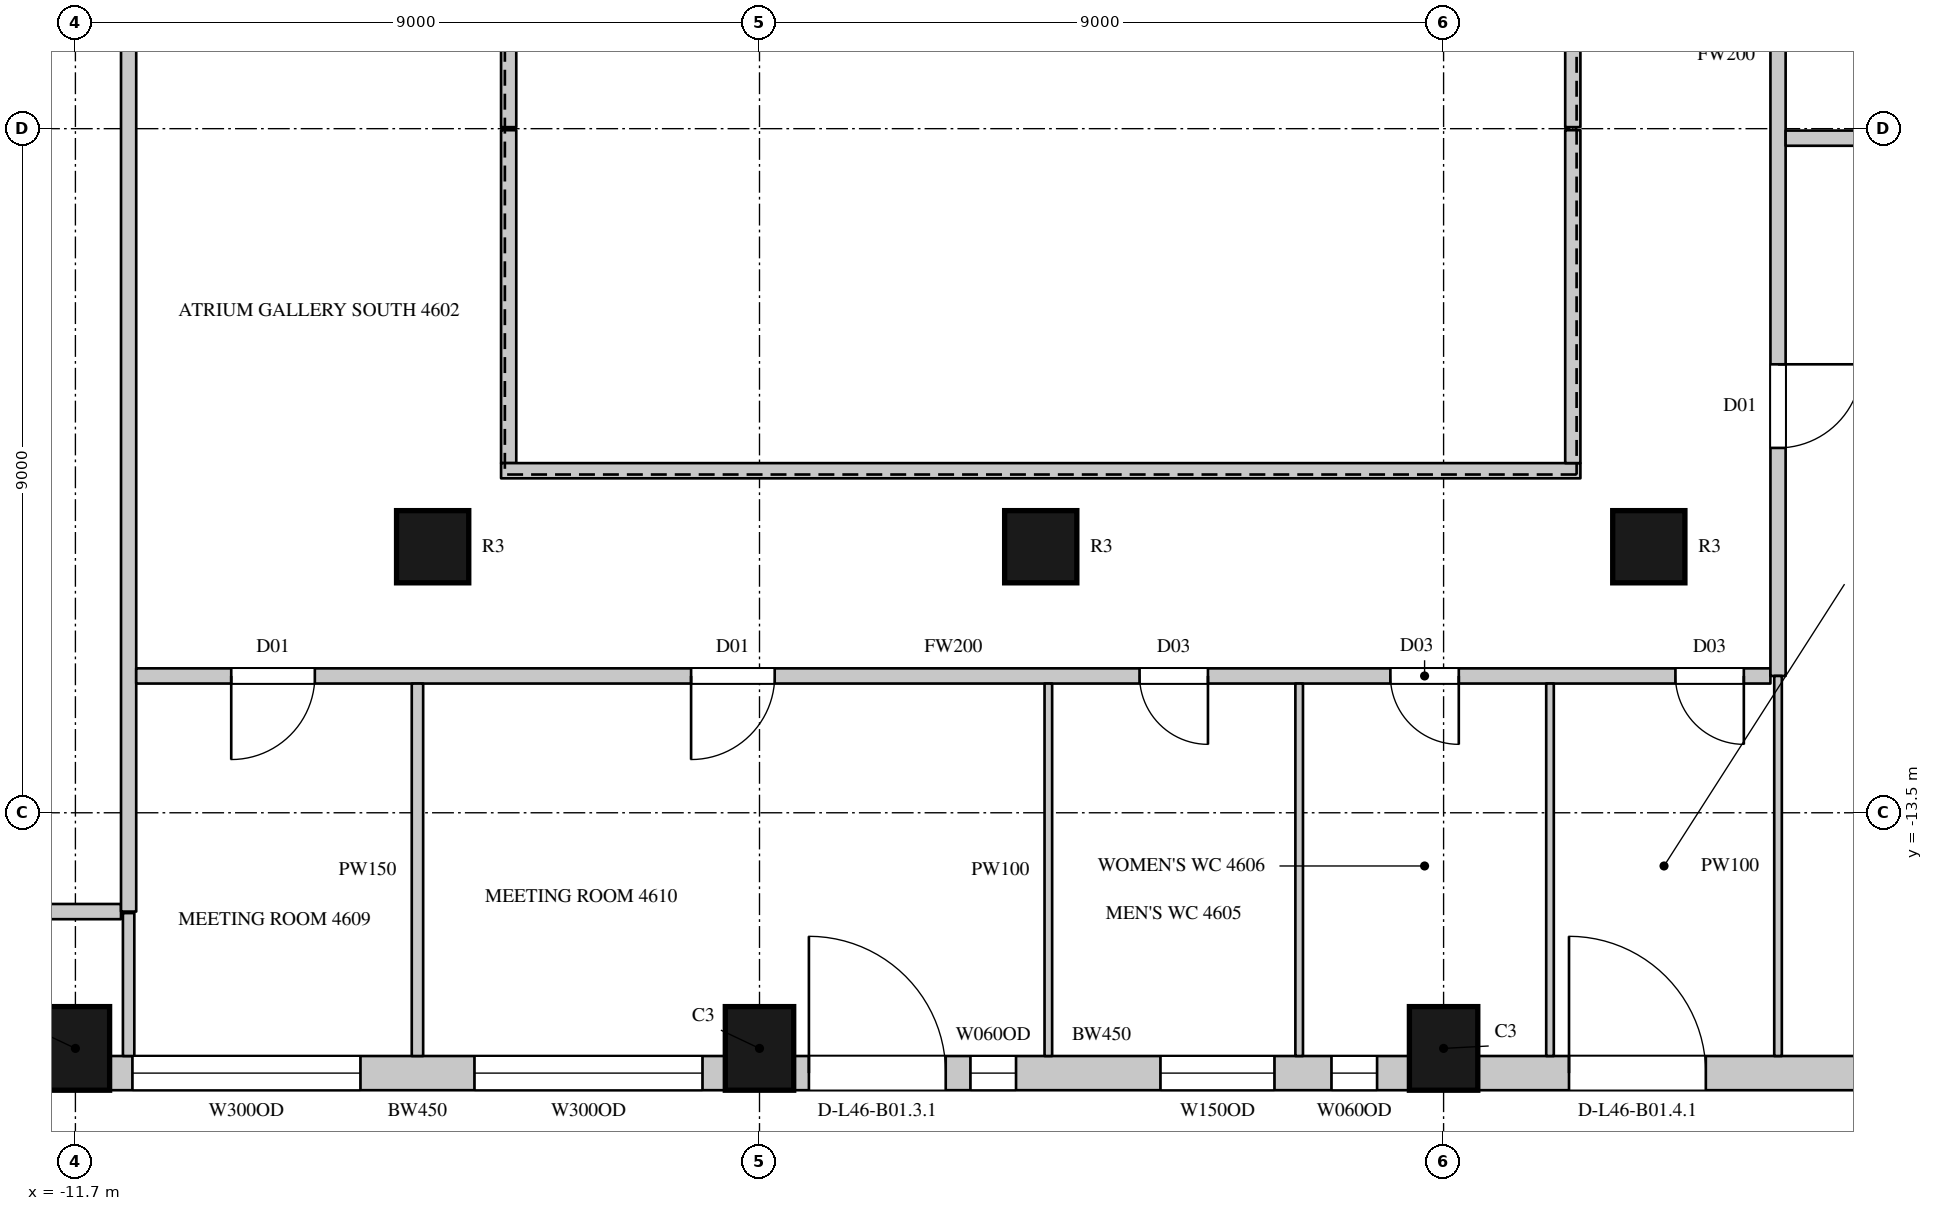
"""IFC4 building model, lengths in metres.
Left out: names, types, materials, properties, quantities, classifications, styles, units other than length and angle.
Written with IfcOpenShell. Run it as: python <this file> out.ifc"""

import sys

from ifc_helpers import new_model, si_unit, direction, frame, frame_2d, origin, origin_2d, place, context, subcontext, project, spatial, rectangle, circle, extrude, element, fill, save


model = new_model("IFC4")
c1 = context("Model", 3, precision=1e-05, world=origin(), true_north=direction((0.0, 1.0)))
c2 = subcontext(c1, "Body", "Model", "MODEL_VIEW")
j1 = project(units=[si_unit("LENGTHUNIT", "METRE"), si_unit("PLANEANGLEUNIT", "RADIAN")], contexts=[c1])
p1 = place(None, origin())
s1 = spatial("IfcSite", under=j1, at=p1, CompositionType="ELEMENT")
p2 = place(p1, origin())
s2 = spatial("IfcBuilding", under=s1, at=p2, CompositionType="ELEMENT")
p3 = place(p2, frame((0.0, 0.0, 209.7)))
s3 = spatial("IfcBuildingStorey", under=s2, at=p3, CompositionType="ELEMENT", Elevation=209.7)
for number, where, z_axis, x_axis in (
    (1, (-11.7, -16.6, 0.0), (0.0, 0.0, 1.0), (1.0, 0.0, 0.0)),
    (2, (-2.7, -16.6, 0.0), (0.0, 0.0, 1.0), (1.0, 0.0, 0.0)),
    (3, (6.3, -16.6, 0.0), (0.0, 0.0, 1.0), (1.0, 0.0, 0.0)),
):
    element("IfcColumn", number, at=place(p3, frame(where, z_axis=z_axis, x_axis=x_axis)), inside=s3, PredefinedType="COLUMN", context=c2, shape_type="SweptSolid", body=[
        extrude(rectangle(XDim=0.9, YDim=1.1, at=origin_2d()), origin(), (0.0, 0.0, 1.0), 4.1),
    ])
for number, where, z_axis, x_axis in (
    (4, (-7.0, -10.0, 0.0), (0.0, 0.0, 1.0), (1.0, 0.0, 0.0)),
    (5, (1.0, -10.0, 0.0), (0.0, 0.0, 1.0), (1.0, 0.0, 0.0)),
    (6, (9.0, -10.0, 0.0), (0.0, 0.0, 1.0), (1.0, 0.0, 0.0)),
):
    element("IfcColumn", number, at=place(p3, frame(where, z_axis=z_axis, x_axis=x_axis)), inside=s3, PredefinedType="COLUMN", context=c2, shape_type="SweptSolid", body=[
        extrude(circle(Radius=0.475, at=origin_2d()), origin(), (0.0, 0.0, 1.0), 4.1),
    ])
p4 = place(p3, frame((-11.25, -16.925, 0.0), z_axis=(0.0, 0.0, 1.0), x_axis=(1.0, 0.0, 0.0)))
e7 = element("IfcWall", 7, at=p4, inside=s3, PredefinedType="SOLIDWALL", context=c2, shape_type="SweptSolid", body=[
    extrude(rectangle(XDim=8.1, YDim=0.45, at=frame_2d((4.05, 0.0))), origin(), (0.0, 0.0, 1.0), 3.8),
])
p5 = place(p4, frame((0.3, 0.0, 1.05)))
e8 = element("IfcOpeningElement", 8, at=p5, cuts=e7, PredefinedType="OPENING", context=c2, shape_type="SweptSolid", body=[
    extrude(rectangle(XDim=3.0, YDim=2.4, at=frame_2d((1.5, 1.2))), frame((0.0, 0.235, 0.0), z_axis=(0.0, -1.0, 0.0), x_axis=(1.0, 0.0, 0.0)), (0.0, 0.0, 1.0), 0.47),
])
p6 = place(p4, frame((4.8, 0.0, 1.05)))
e9 = element("IfcOpeningElement", 9, at=p6, cuts=e7, PredefinedType="OPENING", context=c2, shape_type="SweptSolid", body=[
    extrude(rectangle(XDim=3.0, YDim=2.4, at=frame_2d((1.5, 1.2))), frame((0.0, 0.235, 0.0), z_axis=(0.0, -1.0, 0.0), x_axis=(1.0, 0.0, 0.0)), (0.0, 0.0, 1.0), 0.47),
])
p7 = place(p3, frame((-2.25, -16.925, 0.0), z_axis=(0.0, 0.0, 1.0), x_axis=(1.0, 0.0, 0.0)))
e10 = element("IfcWall", 10, at=p7, inside=s3, PredefinedType="SOLIDWALL", context=c2, shape_type="SweptSolid", body=[
    extrude(rectangle(XDim=8.1, YDim=0.45, at=frame_2d((4.05, 0.0))), origin(), (0.0, 0.0, 1.0), 3.8),
])
p8 = place(p7, frame((0.2, 0.0, 0.0)))
e11 = element("IfcOpeningElement", 11, at=p8, cuts=e10, PredefinedType="OPENING", context=c2, shape_type="SweptSolid", body=[
    extrude(rectangle(XDim=1.8, YDim=2.4, at=frame_2d((0.9, 1.2))), frame((0.0, 0.235, 0.0), z_axis=(0.0, -1.0, 0.0), x_axis=(1.0, 0.0, 0.0)), (0.0, 0.0, 1.0), 0.47),
])
p9 = place(p7, frame((2.325, 0.0, 1.05)))
e12 = element("IfcOpeningElement", 12, at=p9, cuts=e10, PredefinedType="OPENING", context=c2, shape_type="SweptSolid", body=[
    extrude(rectangle(XDim=0.6, YDim=2.4, at=frame_2d((0.3, 1.2))), frame((0.0, 0.235, 0.0), z_axis=(0.0, -1.0, 0.0), x_axis=(1.0, 0.0, 0.0)), (0.0, 0.0, 1.0), 0.47),
])
p10 = place(p7, frame((4.825, 0.0, 1.05)))
e13 = element("IfcOpeningElement", 13, at=p10, cuts=e10, PredefinedType="OPENING", context=c2, shape_type="SweptSolid", body=[
    extrude(rectangle(XDim=1.5, YDim=2.4, at=frame_2d((0.75, 1.2))), frame((0.0, 0.235, 0.0), z_axis=(0.0, -1.0, 0.0), x_axis=(1.0, 0.0, 0.0)), (0.0, 0.0, 1.0), 0.47),
])
p11 = place(p7, frame((7.075, 0.0, 1.05)))
e14 = element("IfcOpeningElement", 14, at=p11, cuts=e10, PredefinedType="OPENING", context=c2, shape_type="SweptSolid", body=[
    extrude(rectangle(XDim=0.6, YDim=2.4, at=frame_2d((0.3, 1.2))), frame((0.0, 0.235, 0.0), z_axis=(0.0, -1.0, 0.0), x_axis=(1.0, 0.0, 0.0)), (0.0, 0.0, 1.0), 0.47),
])
p12 = place(p3, frame((6.75, -16.925, 0.0), z_axis=(0.0, 0.0, 1.0), x_axis=(1.0, 0.0, 0.0)))
e15 = element("IfcWall", 15, at=p12, inside=s3, PredefinedType="SOLIDWALL", context=c2, shape_type="SweptSolid", body=[
    extrude(rectangle(XDim=6.414, YDim=0.45, at=frame_2d((3.207, 0.0))), origin(), (0.0, 0.0, 1.0), 3.8),
])
p13 = place(p12, frame((1.2, 0.0, 0.0)))
e16 = element("IfcOpeningElement", 16, at=p13, cuts=e15, PredefinedType="OPENING", context=c2, shape_type="SweptSolid", body=[
    extrude(rectangle(XDim=1.8, YDim=2.4, at=frame_2d((0.9, 1.2))), frame((0.0, 0.235, 0.0), z_axis=(0.0, -1.0, 0.0), x_axis=(1.0, 0.0, 0.0)), (0.0, 0.0, 1.0), 0.47),
])
p14 = place(p3, frame((-13.97, -14.8, 0.0), z_axis=(0.0, 0.0, 1.0), x_axis=(1.0, 0.0, 0.0)))
e17 = element("IfcWall", 17, at=p14, inside=s3, PredefinedType="PARTITIONING", context=c2, shape_type="SweptSolid", body=[
    extrude(rectangle(XDim=2.87, YDim=0.2, at=frame_2d((1.435, 0.0))), origin(), (0.0, 0.0, 1.0), 3.8),
])
p15 = place(p3, frame((-11.0, -14.8, 0.0), z_axis=(0.0, 0.0, 1.0), x_axis=(0.0, 1.0, 0.0)))
e18 = element("IfcWall", 18, at=p15, inside=s3, PredefinedType="PARTITIONING", context=c2, shape_type="SweptSolid", body=[
    extrude(rectangle(XDim=29.6, YDim=0.2, at=frame_2d((14.8, 0.0))), origin(), (0.0, 0.0, 1.0), 3.8),
])
p16 = place(p15, frame((17.9, 0.0, 0.0)))
e19 = element("IfcOpeningElement", 19, at=p16, cuts=e18, PredefinedType="OPENING", context=c2, shape_type="SweptSolid", body=[
    extrude(rectangle(XDim=1.5, YDim=2.4, at=frame_2d((0.75, 1.2))), frame((0.0, 0.11, 0.0), z_axis=(0.0, -1.0, 0.0), x_axis=(1.0, 0.0, 0.0)), (0.0, 0.0, 1.0), 0.22),
])
p17 = place(p3, frame((-10.9, -11.7, 0.0), z_axis=(0.0, 0.0, 1.0), x_axis=(1.0, 0.0, 0.0)))
e20 = element("IfcWall", 20, at=p17, inside=s3, PredefinedType="PARTITIONING", context=c2, shape_type="SweptSolid", body=[
    extrude(rectangle(XDim=21.5, YDim=0.2, at=frame_2d((10.75, 0.0))), origin(), (0.0, 0.0, 1.0), 3.8),
])
p18 = place(p17, frame((13.2, 0.0, 0.0)))
e21 = element("IfcOpeningElement", 21, at=p18, cuts=e20, PredefinedType="OPENING", context=c2, shape_type="SweptSolid", body=[
    extrude(rectangle(XDim=0.9, YDim=2.2, at=frame_2d((0.45, 1.1))), frame((0.0, 0.11, 0.0), z_axis=(0.0, -1.0, 0.0), x_axis=(1.0, 0.0, 0.0)), (0.0, 0.0, 1.0), 0.22),
])
p19 = place(p17, frame((16.5, 0.0, 0.0)))
e22 = element("IfcOpeningElement", 22, at=p19, cuts=e20, PredefinedType="OPENING", context=c2, shape_type="SweptSolid", body=[
    extrude(rectangle(XDim=0.9, YDim=2.2, at=frame_2d((0.45, 1.1))), frame((0.0, 0.11, 0.0), z_axis=(0.0, -1.0, 0.0), x_axis=(1.0, 0.0, 0.0)), (0.0, 0.0, 1.0), 0.22),
])
p20 = place(p17, frame((20.25, 0.0, 0.0)))
e23 = element("IfcOpeningElement", 23, at=p20, cuts=e20, PredefinedType="OPENING", context=c2, shape_type="SweptSolid", body=[
    extrude(rectangle(XDim=0.9, YDim=2.2, at=frame_2d((0.45, 1.1))), frame((0.0, 0.11, 0.0), z_axis=(0.0, -1.0, 0.0), x_axis=(1.0, 0.0, 0.0)), (0.0, 0.0, 1.0), 0.22),
])
p21 = place(p17, frame((1.25, 0.0, 0.0)))
e24 = element("IfcOpeningElement", 24, at=p21, cuts=e20, PredefinedType="OPENING", context=c2, shape_type="SweptSolid", body=[
    extrude(rectangle(XDim=1.1, YDim=2.4, at=frame_2d((0.55, 1.2))), frame((0.0, 0.11, 0.0), z_axis=(0.0, -1.0, 0.0), x_axis=(1.0, 0.0, 0.0)), (0.0, 0.0, 1.0), 0.22),
])
p22 = place(p17, frame((7.3, 0.0, 0.0)))
e25 = element("IfcOpeningElement", 25, at=p22, cuts=e20, PredefinedType="OPENING", context=c2, shape_type="SweptSolid", body=[
    extrude(rectangle(XDim=1.1, YDim=2.4, at=frame_2d((0.55, 1.2))), frame((0.0, 0.11, 0.0), z_axis=(0.0, -1.0, 0.0), x_axis=(1.0, 0.0, 0.0)), (0.0, 0.0, 1.0), 0.22),
])
p23 = place(p3, frame((-6.0, -8.9, 0.0), z_axis=(0.0, 0.0, 1.0), x_axis=(0.0, 1.0, 0.0)))
e26 = element("IfcWall", 26, at=p23, inside=s3, PredefinedType="PARTITIONING", context=c2, shape_type="SweptSolid", body=[
    extrude(rectangle(XDim=4.38, YDim=0.2, at=frame_2d((2.19, 0.0))), origin(), (0.0, 0.0, 1.0), 3.8),
])
p24 = place(p3, frame((-6.1, -9.0, 0.0), z_axis=(0.0, 0.0, 1.0), x_axis=(1.0, 0.0, 0.0)))
e27 = element("IfcWall", 27, at=p24, inside=s3, PredefinedType="PARTITIONING", context=c2, shape_type="SweptSolid", body=[
    extrude(rectangle(XDim=14.2, YDim=0.2, at=frame_2d((7.1, 0.0))), origin(), (0.0, 0.0, 1.0), 3.8),
])
p25 = place(p3, frame((-6.0, -4.48, 0.0), z_axis=(0.0, 0.0, 1.0), x_axis=(0.0, 1.0, 0.0)))
e28 = element("IfcWall", 28, at=p25, inside=s3, PredefinedType="PARTITIONING", context=c2, shape_type="SweptSolid", body=[
    extrude(rectangle(XDim=13.38, YDim=0.2, at=frame_2d((6.69, 0.0))), origin(), (0.0, 0.0, 1.0), 3.8),
])
p26 = place(p3, frame((8.0, -8.9, 0.0), z_axis=(0.0, 0.0, 1.0), x_axis=(0.0, 1.0, 0.0)))
e29 = element("IfcWall", 29, at=p26, inside=s3, PredefinedType="PARTITIONING", context=c2, shape_type="SweptSolid", body=[
    extrude(rectangle(XDim=4.38, YDim=0.2, at=frame_2d((2.19, 0.0))), origin(), (0.0, 0.0, 1.0), 3.8),
])
p27 = place(p3, frame((8.0, -4.48, 0.0), z_axis=(0.0, 0.0, 1.0), x_axis=(0.0, 1.0, 0.0)))
e30 = element("IfcWall", 30, at=p27, inside=s3, PredefinedType="PARTITIONING", context=c2, shape_type="SweptSolid", body=[
    extrude(rectangle(XDim=13.38, YDim=0.2, at=frame_2d((6.69, 0.0))), origin(), (0.0, 0.0, 1.0), 3.8),
])
p28 = place(p3, frame((10.7, -11.7, 0.0), z_axis=(0.0, 0.0, 1.0), x_axis=(0.0, 1.0, 0.0)))
e31 = element("IfcWall", 31, at=p28, inside=s3, PredefinedType="PARTITIONING", context=c2, shape_type="SweptSolid", body=[
    extrude(rectangle(XDim=16.345, YDim=0.2, at=frame_2d((8.172, 0.0))), origin(), (0.0, 0.0, 1.0), 3.8),
])
p29 = place(p28, frame((12.35, 0.0, 0.0)))
e32 = element("IfcOpeningElement", 32, at=p29, cuts=e31, PredefinedType="OPENING", context=c2, shape_type="SweptSolid", body=[
    extrude(rectangle(XDim=1.5, YDim=2.4, at=frame_2d((0.75, 1.2))), frame((0.0, 0.11, 0.0), z_axis=(0.0, -1.0, 0.0), x_axis=(1.0, 0.0, 0.0)), (0.0, 0.0, 1.0), 0.22),
])
p30 = place(p28, frame((3.0, 0.0, 0.0)))
e33 = element("IfcOpeningElement", 33, at=p30, cuts=e31, PredefinedType="OPENING", context=c2, shape_type="SweptSolid", body=[
    extrude(rectangle(XDim=1.1, YDim=2.4, at=frame_2d((0.55, 1.2))), frame((0.0, 0.11, 0.0), z_axis=(0.0, -1.0, 0.0), x_axis=(1.0, 0.0, 0.0)), (0.0, 0.0, 1.0), 0.22),
])
p31 = place(p3, frame((10.8, -4.625, 0.0), z_axis=(0.0, 0.0, 1.0), x_axis=(1.0, 0.0, 0.0)))
e34 = element("IfcWall", 34, at=p31, inside=s3, PredefinedType="PARTITIONING", context=c2, shape_type="SweptSolid", body=[
    extrude(rectangle(XDim=3.875, YDim=0.2, at=frame_2d((1.938, 0.0))), origin(), (0.0, 0.0, 1.0), 3.8),
])
p32 = place(p3, frame((-11.0, -16.7, 0.0), z_axis=(0.0, 0.0, 1.0), x_axis=(0.0, 1.0, 0.0)))
e35 = element("IfcWall", 35, at=p32, inside=s3, PredefinedType="PARTITIONING", context=c2, shape_type="SweptSolid", body=[
    extrude(rectangle(XDim=1.88, YDim=0.15, at=frame_2d((0.94, 0.0))), origin(), (0.0, 0.0, 1.0), 3.8),
])
p33 = place(p3, frame((-7.2, -16.7, 0.0), z_axis=(0.0, 0.0, 1.0), x_axis=(0.0, 1.0, 0.0)))
e36 = element("IfcWall", 36, at=p33, inside=s3, PredefinedType="PARTITIONING", context=c2, shape_type="SweptSolid", body=[
    extrude(rectangle(XDim=4.9, YDim=0.15, at=frame_2d((2.45, 0.0))), origin(), (0.0, 0.0, 1.0), 3.15),
])
for number, where, z_axis, x_axis in (
    (37, (1.1, -16.7, 0.0), (0.0, 0.0, 1.0), (0.0, 1.0, 0.0)),
    (38, (4.4, -16.7, 0.0), (0.0, 0.0, 1.0), (0.0, 1.0, 0.0)),
    (39, (7.7, -16.7, 0.0), (0.0, 0.0, 1.0), (0.0, 1.0, 0.0)),
):
    element("IfcWall", number, at=place(p3, frame(where, z_axis=z_axis, x_axis=x_axis)), inside=s3, PredefinedType="PARTITIONING", context=c2, shape_type="SweptSolid", body=[
        extrude(rectangle(XDim=4.9, YDim=0.1, at=frame_2d((2.45, 0.0))), origin(), (0.0, 0.0, 1.0), 3.8),
    ])
p34 = place(p3, frame((10.7, -16.7, 0.0), z_axis=(0.0, 0.0, 1.0), x_axis=(0.0, 1.0, 0.0)))
e40 = element("IfcWall", 40, at=p34, inside=s3, PredefinedType="PARTITIONING", context=c2, shape_type="SweptSolid", body=[
    extrude(rectangle(XDim=5.0, YDim=0.1, at=frame_2d((2.5, 0.0))), origin(), (0.0, 0.0, 1.0), 3.8),
])
p35 = place(p5, origin())
e41 = element("IfcWindow", 41, at=p35, inside=s3, PartitioningType="SINGLE_PANEL", PredefinedType="WINDOW", context=c2, shape_type="SweptSolid", body=[
    extrude(rectangle(XDim=3.0, YDim=2.4, at=frame_2d((1.5, 1.2))), frame((0.0, 0.135, 0.0), z_axis=(0.0, -1.0, 0.0), x_axis=(1.0, 0.0, 0.0)), (0.0, 0.0, 1.0), 0.06),
])
fill(e8, e41)
p36 = place(p6, origin())
e42 = element("IfcWindow", 42, at=p36, inside=s3, PartitioningType="SINGLE_PANEL", PredefinedType="WINDOW", context=c2, shape_type="SweptSolid", body=[
    extrude(rectangle(XDim=3.0, YDim=2.4, at=frame_2d((1.5, 1.2))), frame((0.0, 0.135, 0.0), z_axis=(0.0, -1.0, 0.0), x_axis=(1.0, 0.0, 0.0)), (0.0, 0.0, 1.0), 0.06),
])
fill(e9, e42)
p37 = place(p8, origin())
e43 = element("IfcDoor", 43, at=p37, inside=s3, OperationType="SLIDING_TO_LEFT", PredefinedType="DOOR", context=c2, shape_type="SweptSolid", body=[
    extrude(rectangle(XDim=1.8, YDim=2.4, at=frame_2d((0.9, 1.2))), frame((0.0, 0.13, 0.0), z_axis=(0.0, -1.0, 0.0), x_axis=(1.0, 0.0, 0.0)), (0.0, 0.0, 1.0), 0.05),
])
fill(e11, e43)
p38 = place(p13, origin())
e44 = element("IfcDoor", 44, at=p38, inside=s3, OperationType="SLIDING_TO_LEFT", PredefinedType="DOOR", context=c2, shape_type="SweptSolid", body=[
    extrude(rectangle(XDim=1.8, YDim=2.4, at=frame_2d((0.9, 1.2))), frame((0.0, 0.13, 0.0), z_axis=(0.0, -1.0, 0.0), x_axis=(1.0, 0.0, 0.0)), (0.0, 0.0, 1.0), 0.05),
])
fill(e16, e44)
p39 = place(p18, origin())
e45 = element("IfcDoor", 45, at=p39, inside=s3, OperationType="SINGLE_SWING_LEFT", PredefinedType="DOOR", context=c2, shape_type="SweptSolid", body=[
    extrude(rectangle(XDim=0.9, YDim=2.2, at=frame_2d((0.45, 1.1))), frame((0.0, 0.025, 0.0), z_axis=(0.0, -1.0, 0.0), x_axis=(1.0, 0.0, 0.0)), (0.0, 0.0, 1.0), 0.05),
])
fill(e21, e45)
p40 = place(p19, origin())
e46 = element("IfcDoor", 46, at=p40, inside=s3, OperationType="SINGLE_SWING_LEFT", PredefinedType="DOOR", context=c2, shape_type="SweptSolid", body=[
    extrude(rectangle(XDim=0.9, YDim=2.2, at=frame_2d((0.45, 1.1))), frame((0.0, 0.025, 0.0), z_axis=(0.0, -1.0, 0.0), x_axis=(1.0, 0.0, 0.0)), (0.0, 0.0, 1.0), 0.05),
])
fill(e22, e46)
p41 = place(p20, origin())
e47 = element("IfcDoor", 47, at=p41, inside=s3, OperationType="SINGLE_SWING_LEFT", PredefinedType="DOOR", context=c2, shape_type="SweptSolid", body=[
    extrude(rectangle(XDim=0.9, YDim=2.2, at=frame_2d((0.45, 1.1))), frame((0.0, 0.025, 0.0), z_axis=(0.0, -1.0, 0.0), x_axis=(1.0, 0.0, 0.0)), (0.0, 0.0, 1.0), 0.05),
])
fill(e23, e47)
p42 = place(p21, origin())
e48 = element("IfcDoor", 48, at=p42, inside=s3, OperationType="SINGLE_SWING_RIGHT", PredefinedType="DOOR", context=c2, shape_type="SweptSolid", body=[
    extrude(rectangle(XDim=1.1, YDim=2.4, at=frame_2d((0.55, 1.2))), frame((0.0, 0.025, 0.0), z_axis=(0.0, -1.0, 0.0), x_axis=(1.0, 0.0, 0.0)), (0.0, 0.0, 1.0), 0.05),
])
fill(e24, e48)
p43 = place(p22, origin())
e49 = element("IfcDoor", 49, at=p43, inside=s3, OperationType="SINGLE_SWING_RIGHT", PredefinedType="DOOR", context=c2, shape_type="SweptSolid", body=[
    extrude(rectangle(XDim=1.1, YDim=2.4, at=frame_2d((0.55, 1.2))), frame((0.0, 0.025, 0.0), z_axis=(0.0, -1.0, 0.0), x_axis=(1.0, 0.0, 0.0)), (0.0, 0.0, 1.0), 0.05),
])
fill(e25, e49)
p44 = place(p30, origin())
e50 = element("IfcDoor", 50, at=p44, inside=s3, OperationType="SINGLE_SWING_LEFT", PredefinedType="DOOR", context=c2, shape_type="SweptSolid", body=[
    extrude(rectangle(XDim=1.1, YDim=2.4, at=frame_2d((0.55, 1.2))), frame((0.0, 0.025, 0.0), z_axis=(0.0, -1.0, 0.0), x_axis=(1.0, 0.0, 0.0)), (0.0, 0.0, 1.0), 0.05),
])
fill(e33, e50)
p45 = place(p9, origin())
e51 = element("IfcWindow", 51, at=p45, inside=s3, PartitioningType="SINGLE_PANEL", PredefinedType="WINDOW", context=c2, shape_type="SweptSolid", body=[
    extrude(rectangle(XDim=0.6, YDim=2.4, at=frame_2d((0.3, 1.2))), frame((0.0, 0.135, 0.0), z_axis=(0.0, -1.0, 0.0), x_axis=(1.0, 0.0, 0.0)), (0.0, 0.0, 1.0), 0.06),
])
fill(e12, e51)
p46 = place(p10, origin())
e52 = element("IfcWindow", 52, at=p46, inside=s3, PartitioningType="SINGLE_PANEL", PredefinedType="WINDOW", context=c2, shape_type="SweptSolid", body=[
    extrude(rectangle(XDim=1.5, YDim=2.4, at=frame_2d((0.75, 1.2))), frame((0.0, 0.135, 0.0), z_axis=(0.0, -1.0, 0.0), x_axis=(1.0, 0.0, 0.0)), (0.0, 0.0, 1.0), 0.06),
])
fill(e13, e52)
p47 = place(p11, origin())
e53 = element("IfcWindow", 53, at=p47, inside=s3, PartitioningType="SINGLE_PANEL", PredefinedType="WINDOW", context=c2, shape_type="SweptSolid", body=[
    extrude(rectangle(XDim=0.6, YDim=2.4, at=frame_2d((0.3, 1.2))), frame((0.0, 0.135, 0.0), z_axis=(0.0, -1.0, 0.0), x_axis=(1.0, 0.0, 0.0)), (0.0, 0.0, 1.0), 0.06),
])
fill(e14, e53)
save(model, sys.argv[1])
